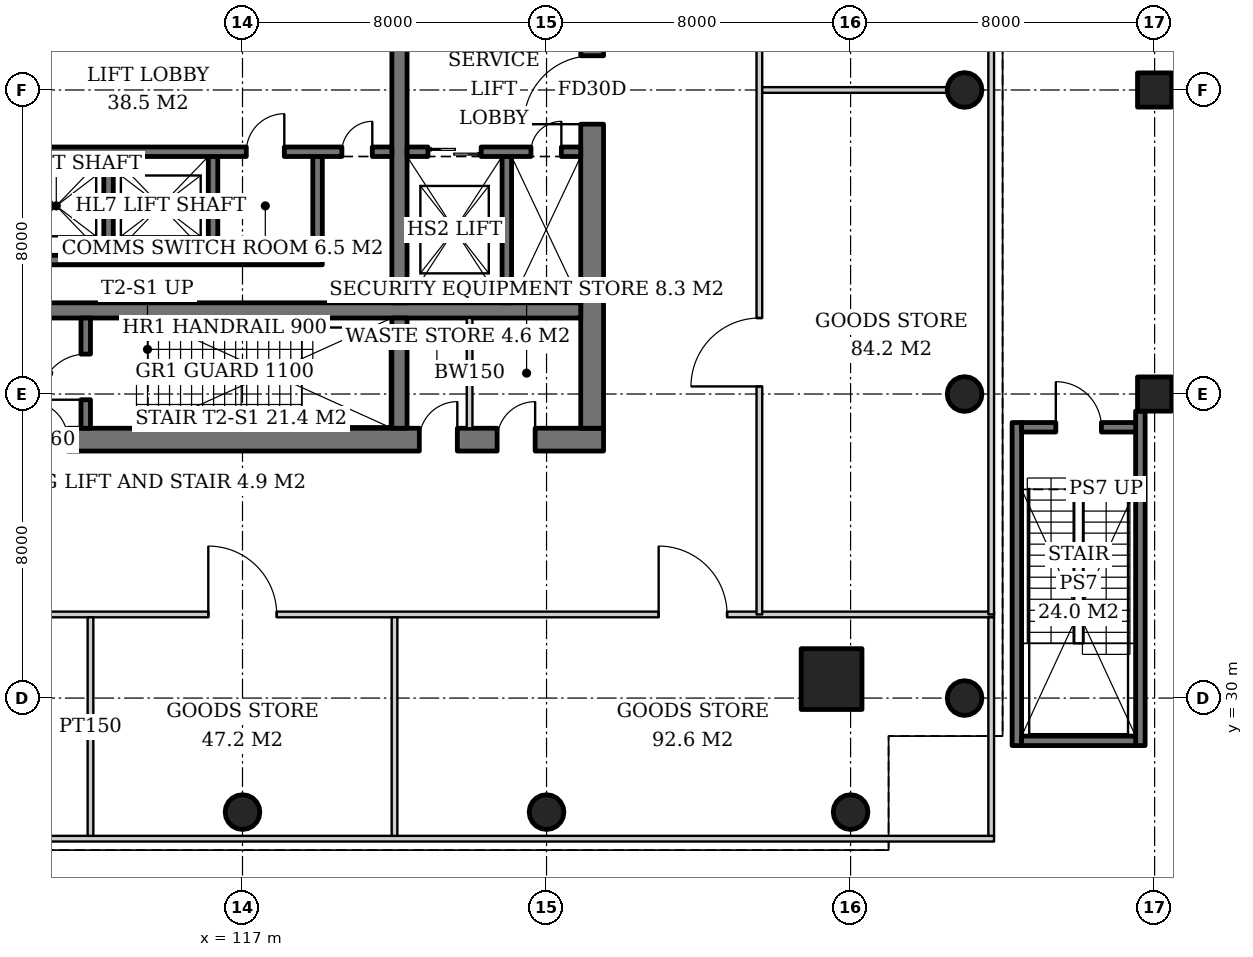
"""IFC4 building model, lengths in metres.
Left out: names, types, materials, properties, quantities, classifications, styles, units other than length and angle.
Written with IfcOpenShell. Run it as: python <this file> out.ifc"""

import sys

from ifc_helpers import new_model, si_unit, direction, frame, frame_2d, origin, origin_2d, place, context, subcontext, project, spatial, rectangle, hollow_circle, extrude, element, fill, save


model = new_model("IFC4")
c1 = context("Model", 3, precision=1e-05, world=origin(), true_north=direction((0.0, 1.0)))
c2 = subcontext(c1, "Body", "Model", "MODEL_VIEW")
j1 = project(units=[si_unit("LENGTHUNIT", "METRE"), si_unit("PLANEANGLEUNIT", "RADIAN")], contexts=[c1])
p1 = place(None, origin())
s1 = spatial("IfcSite", under=j1, at=p1, CompositionType="ELEMENT")
p2 = place(p1, origin())
s2 = spatial("IfcBuilding", under=s1, at=p2, CompositionType="ELEMENT")
p3 = place(p2, frame((0.0, 0.0, 6.0)))
s3 = spatial("IfcBuildingStorey", under=s2, at=p3, CompositionType="ELEMENT", Elevation=6.0)
for number, where, z_axis, x_axis in (
    (1, (141.0, 38.0, 0.0), (0.0, 0.0, 1.0), (1.0, 0.0, 0.0)),
    (2, (141.0, 46.0, 0.0), (0.0, 0.0, 1.0), (1.0, 0.0, 0.0)),
):
    element("IfcColumn", number, at=place(p3, frame(where, z_axis=z_axis, x_axis=x_axis)), inside=s3, PredefinedType="COLUMN", context=c2, shape_type="SweptSolid", body=[
        extrude(rectangle(XDim=0.9, YDim=0.9, at=origin_2d()), origin(), (0.0, 0.0, 1.0), 5.0),
    ])
for number, where, z_axis, x_axis in (
    (3, (136.0, 30.0, 0.0), (0.0, 0.0, 1.0), (1.0, 0.0, 0.0)),
    (4, (136.0, 38.0, 0.0), (0.0, 0.0, 1.0), (1.0, 0.0, 0.0)),
    (5, (136.0, 46.0, 0.0), (0.0, 0.0, 1.0), (1.0, 0.0, 0.0)),
):
    element("IfcColumn", number, at=place(p3, frame(where, z_axis=z_axis, x_axis=x_axis)), inside=s3, PredefinedType="COLUMN", context=c2, shape_type="SweptSolid", body=[
        extrude(hollow_circle(Radius=0.457, WallThickness=0.03, at=origin_2d()), origin(), (0.0, 0.0, 1.0), 5.0),
    ])
p4 = place(p3, frame((132.5, 30.5, 0.0), z_axis=(0.0, 0.0, 1.0), x_axis=(1.0, 0.0, 0.0)))
e6 = element("IfcColumn", 6, at=p4, inside=s3, PredefinedType="COLUMN", context=c2, shape_type="SweptSolid", body=[
    extrude(rectangle(XDim=1.6, YDim=1.6, at=origin_2d()), origin(), (0.0, 0.0, 1.0), 5.0),
])
for number, where, z_axis, x_axis in (
    (7, (133.0, 27.0, 0.0), (0.0, 0.0, 1.0), (1.0, 0.0, 0.0)),
    (8, (117.0, 27.0, 0.0), (0.0, 0.0, 1.0), (1.0, 0.0, 0.0)),
    (9, (125.0, 27.0, 0.0), (0.0, 0.0, 1.0), (1.0, 0.0, 0.0)),
):
    element("IfcColumn", number, at=place(p3, frame(where, z_axis=z_axis, x_axis=x_axis)), inside=s3, PredefinedType="COLUMN", context=c2, shape_type="SweptSolid", body=[
        extrude(hollow_circle(Radius=0.457, WallThickness=0.03, at=origin_2d()), origin(), (0.0, 0.0, 1.0), 5.0),
    ])
p5 = place(p3, frame((107.5, 36.8, 0.0), z_axis=(0.0, 0.0, 1.0), x_axis=(1.0, 0.0, 0.0)))
e10 = element("IfcWall", 10, at=p5, inside=s3, PredefinedType="SHEAR", context=c2, shape_type="SweptSolid", body=[
    extrude(rectangle(XDim=19.0, YDim=0.6, at=frame_2d((9.5, 0.0))), origin(), (0.0, 0.0, 1.0), 5.0),
])
p6 = place(p5, frame((3.9, 0.0, 0.0)))
e11 = element("IfcOpeningElement", 11, at=p6, cuts=e10, PredefinedType="OPENING", context=c2, shape_type="SweptSolid", body=[
    extrude(rectangle(XDim=1.0, YDim=2.1, at=frame_2d((0.5, 1.05))), frame((0.0, 0.31, 0.0), z_axis=(0.0, -1.0, 0.0), x_axis=(1.0, 0.0, 0.0)), (0.0, 0.0, 1.0), 0.62),
])
p7 = place(p5, frame((14.153, 0.0, 0.0)))
e12 = element("IfcOpeningElement", 12, at=p7, cuts=e10, PredefinedType="OPENING", context=c2, shape_type="SweptSolid", body=[
    extrude(rectangle(XDim=1.0, YDim=2.1, at=frame_2d((0.5, 1.05))), frame((0.0, 0.31, 0.0), z_axis=(0.0, -1.0, 0.0), x_axis=(1.0, 0.0, 0.0)), (0.0, 0.0, 1.0), 0.62),
])
p8 = place(p5, frame((16.2, 0.0, 0.0)))
e13 = element("IfcOpeningElement", 13, at=p8, cuts=e10, PredefinedType="OPENING", context=c2, shape_type="SweptSolid", body=[
    extrude(rectangle(XDim=1.0, YDim=2.1, at=frame_2d((0.5, 1.05))), frame((0.0, 0.31, 0.0), z_axis=(0.0, -1.0, 0.0), x_axis=(1.0, 0.0, 0.0)), (0.0, 0.0, 1.0), 0.62),
])
p9 = place(p3, frame((126.2, 37.1, 0.0), z_axis=(0.0, 0.0, 1.0), x_axis=(0.0, 1.0, 0.0)))
e14 = element("IfcWall", 14, at=p9, inside=s3, PredefinedType="SHEAR", context=c2, shape_type="SweptSolid", body=[
    extrude(rectangle(XDim=17.8, YDim=0.6, at=frame_2d((8.9, 0.0))), origin(), (0.0, 0.0, 1.0), 5.0),
])
p10 = place(p9, frame((8.0, 0.0, 0.0)))
e15 = element("IfcOpeningElement", 15, at=p10, cuts=e14, PredefinedType="OPENING", context=c2, shape_type="SweptSolid", body=[
    extrude(rectangle(XDim=1.8, YDim=2.4, at=frame_2d((0.9, 1.2))), frame((0.0, 0.31, 0.0), z_axis=(0.0, -1.0, 0.0), x_axis=(1.0, 0.0, 0.0)), (0.0, 0.0, 1.0), 0.62),
])
p11 = place(p3, frame((108.1, 40.2, 0.0), z_axis=(0.0, 0.0, 1.0), x_axis=(1.0, 0.0, 0.0)))
e16 = element("IfcWall", 16, at=p11, inside=s3, PredefinedType="SHEAR", context=c2, shape_type="SweptSolid", body=[
    extrude(rectangle(XDim=17.8, YDim=0.4, at=frame_2d((8.9, 0.0))), origin(), (0.0, 0.0, 1.0), 5.0),
])
p12 = place(p3, frame((121.13, 37.1, 0.0), z_axis=(0.0, 0.0, 1.0), x_axis=(0.0, 1.0, 0.0)))
e17 = element("IfcWall", 17, at=p12, inside=s3, PredefinedType="SHEAR", context=c2, shape_type="SweptSolid", body=[
    extrude(rectangle(XDim=2.9, YDim=0.4, at=frame_2d((1.45, 0.0))), origin(), (0.0, 0.0, 1.0), 5.0),
])
p13 = place(p3, frame((121.13, 40.4, 0.0), z_axis=(0.0, 0.0, 1.0), x_axis=(0.0, 1.0, 0.0)))
e18 = element("IfcWall", 18, at=p13, inside=s3, PredefinedType="SHEAR", context=c2, shape_type="SweptSolid", body=[
    extrude(rectangle(XDim=11.2, YDim=0.4, at=frame_2d((5.6, 0.0))), origin(), (0.0, 0.0, 1.0), 5.0),
])
p14 = place(p3, frame((112.875, 37.1, 0.0), z_axis=(0.0, 0.0, 1.0), x_axis=(0.0, 1.0, 0.0)))
e19 = element("IfcWall", 19, at=p14, inside=s3, PredefinedType="SHEAR", context=c2, shape_type="SweptSolid", body=[
    extrude(rectangle(XDim=2.9, YDim=0.25, at=frame_2d((1.45, 0.0))), origin(), (0.0, 0.0, 1.0), 5.0),
])
p15 = place(p14, frame((0.75, 0.0, 0.0)))
e20 = element("IfcOpeningElement", 20, at=p15, cuts=e19, PredefinedType="OPENING", context=c2, shape_type="SweptSolid", body=[
    extrude(rectangle(XDim=1.2, YDim=2.1, at=frame_2d((0.6, 1.05))), frame((0.0, 0.135, 0.0), z_axis=(0.0, -1.0, 0.0), x_axis=(1.0, 0.0, 0.0)), (0.0, 0.0, 1.0), 0.27),
])
for number, where, z_axis, x_axis in (
    (21, (113.475, 44.25, 0.0), (0.0, 0.0, 1.0), (0.0, -1.0, 0.0)),
    (22, (116.225, 44.25, 0.0), (0.0, 0.0, 1.0), (0.0, -1.0, 0.0)),
    (23, (118.975, 44.25, 0.0), (0.0, 0.0, 1.0), (0.0, -1.0, 0.0)),
):
    element("IfcWall", number, at=place(p3, frame(where, z_axis=z_axis, x_axis=x_axis)), inside=s3, PredefinedType="SHEAR", context=c2, shape_type="SweptSolid", body=[
        extrude(rectangle(XDim=2.6, YDim=0.25, at=frame_2d((1.3, 0.0))), origin(), (0.0, 0.0, 1.0), 5.0),
    ])
p16 = place(p3, frame((108.1, 41.525, 0.0), z_axis=(0.0, 0.0, 1.0), x_axis=(1.0, 0.0, 0.0)))
e24 = element("IfcWall", 24, at=p16, inside=s3, PredefinedType="SHEAR", context=c2, shape_type="SweptSolid", body=[
    extrude(rectangle(XDim=11.0, YDim=0.25, at=frame_2d((5.5, 0.0))), origin(), (0.0, 0.0, 1.0), 5.0),
])
p17 = place(p3, frame((108.1, 44.375, 0.0), z_axis=(0.0, 0.0, 1.0), x_axis=(1.0, 0.0, 0.0)))
e25 = element("IfcWall", 25, at=p17, inside=s3, PredefinedType="SHEAR", context=c2, shape_type="SweptSolid", body=[
    extrude(rectangle(XDim=12.83, YDim=0.25, at=frame_2d((6.415, 0.0))), origin(), (0.0, 0.0, 1.0), 5.0),
])
p18 = place(p17, frame((9.0, 0.0, 0.0)))
e26 = element("IfcOpeningElement", 26, at=p18, cuts=e25, PredefinedType="OPENING", context=c2, shape_type="SweptSolid", body=[
    extrude(rectangle(XDim=1.0, YDim=2.1, at=frame_2d((0.5, 1.05))), frame((0.0, 0.135, 0.0), z_axis=(0.0, -1.0, 0.0), x_axis=(1.0, 0.0, 0.0)), (0.0, 0.0, 1.0), 0.27),
])
p19 = place(p17, frame((11.515, 0.0, 0.0)))
e27 = element("IfcOpeningElement", 27, at=p19, cuts=e25, PredefinedType="OPENING", context=c2, shape_type="SweptSolid", body=[
    extrude(rectangle(XDim=0.8, YDim=2.0, at=frame_2d((0.4, 1.0))), frame((0.0, 0.135, 0.0), z_axis=(0.0, -1.0, 0.0), x_axis=(1.0, 0.0, 0.0)), (0.0, 0.0, 1.0), 0.27),
])
p20 = place(p3, frame((123.955, 44.25, 0.0), z_axis=(0.0, 0.0, 1.0), x_axis=(0.0, -1.0, 0.0)))
e28 = element("IfcWall", 28, at=p20, inside=s3, PredefinedType="SHEAR", context=c2, shape_type="SweptSolid", body=[
    extrude(rectangle(XDim=3.85, YDim=0.25, at=frame_2d((1.925, 0.0))), origin(), (0.0, 0.0, 1.0), 5.0),
])
p21 = place(p3, frame((121.33, 44.375, 0.0), z_axis=(0.0, 0.0, 1.0), x_axis=(1.0, 0.0, 0.0)))
e29 = element("IfcWall", 29, at=p21, inside=s3, PredefinedType="SHEAR", context=c2, shape_type="SweptSolid", body=[
    extrude(rectangle(XDim=4.57, YDim=0.25, at=frame_2d((2.285, 0.0))), origin(), (0.0, 0.0, 1.0), 5.0),
])
p22 = place(p21, frame((0.55, 0.0, 0.0)))
e30 = element("IfcOpeningElement", 30, at=p22, cuts=e29, PredefinedType="OPENING", context=c2, shape_type="SweptSolid", body=[
    extrude(rectangle(XDim=1.4, YDim=2.4, at=frame_2d((0.7, 1.2))), frame((0.0, 0.135, 0.0), z_axis=(0.0, -1.0, 0.0), x_axis=(1.0, 0.0, 0.0)), (0.0, 0.0, 1.0), 0.27),
])
p23 = place(p21, frame((3.26, 0.0, 0.0)))
e31 = element("IfcOpeningElement", 31, at=p23, cuts=e29, PredefinedType="OPENING", context=c2, shape_type="SweptSolid", body=[
    extrude(rectangle(XDim=0.8, YDim=2.0, at=frame_2d((0.4, 1.0))), frame((0.0, 0.135, 0.0), z_axis=(0.0, -1.0, 0.0), x_axis=(1.0, 0.0, 0.0)), (0.0, 0.0, 1.0), 0.27),
])
p24 = place(p3, frame((122.975, 37.1, 0.0), z_axis=(0.0, 0.0, 1.0), x_axis=(0.0, 1.0, 0.0)))
e32 = element("IfcWall", 32, at=p24, inside=s3, PredefinedType="SOLIDWALL", context=c2, shape_type="SweptSolid", body=[
    extrude(rectangle(XDim=2.9, YDim=0.15, at=frame_2d((1.45, 0.0))), origin(), (0.0, 0.0, 1.0), 4.7),
])
p25 = place(p3, frame((137.375, 28.75, 0.0), z_axis=(0.0, 0.0, 1.0), x_axis=(0.0, 1.0, 0.0)))
e33 = element("IfcWall", 33, at=p25, inside=s3, PredefinedType="SOLIDWALL", context=c2, shape_type="SweptSolid", body=[
    extrude(rectangle(XDim=8.5, YDim=0.25, at=frame_2d((4.25, 0.0))), origin(), (0.0, 0.0, 1.0), 4.7),
])
p26 = place(p3, frame((140.625, 28.75, 0.0), z_axis=(0.0, 0.0, 1.0), x_axis=(0.0, 1.0, 0.0)))
e34 = element("IfcWall", 34, at=p26, inside=s3, PredefinedType="SOLIDWALL", context=c2, shape_type="SweptSolid", body=[
    extrude(rectangle(XDim=8.8, YDim=0.25, at=frame_2d((4.4, 0.0))), origin(), (0.0, 0.0, 1.0), 4.7),
])
p27 = place(p3, frame((137.5, 28.875, 0.0), z_axis=(0.0, 0.0, 1.0), x_axis=(1.0, 0.0, 0.0)))
e35 = element("IfcWall", 35, at=p27, inside=s3, PredefinedType="SOLIDWALL", context=c2, shape_type="SweptSolid", body=[
    extrude(rectangle(XDim=3.0, YDim=0.25, at=frame_2d((1.5, 0.0))), origin(), (0.0, 0.0, 1.0), 4.7),
])
p28 = place(p3, frame((137.5, 37.125, 0.0), z_axis=(0.0, 0.0, 1.0), x_axis=(1.0, 0.0, 0.0)))
e36 = element("IfcWall", 36, at=p28, inside=s3, PredefinedType="SOLIDWALL", context=c2, shape_type="SweptSolid", body=[
    extrude(rectangle(XDim=3.0, YDim=0.25, at=frame_2d((1.5, 0.0))), origin(), (0.0, 0.0, 1.0), 4.7),
])
p29 = place(p28, frame((0.9, 0.0, 0.0)))
e37 = element("IfcOpeningElement", 37, at=p29, cuts=e36, PredefinedType="OPENING", context=c2, shape_type="SweptSolid", body=[
    extrude(rectangle(XDim=1.2, YDim=2.1, at=frame_2d((0.6, 1.05))), frame((0.0, 0.135, 0.0), z_axis=(0.0, -1.0, 0.0), x_axis=(1.0, 0.0, 0.0)), (0.0, 0.0, 1.0), 0.27),
])
p30 = place(p3, frame((97.225, 26.3, 0.0), z_axis=(0.0, 0.0, 1.0), x_axis=(1.0, 0.0, 0.0)))
e38 = element("IfcWall", 38, at=p30, inside=s3, PredefinedType="PARTITIONING", context=c2, shape_type="SweptSolid", body=[
    extrude(rectangle(XDim=39.55, YDim=0.15, at=frame_2d((19.775, 0.0))), origin(), (0.0, 0.0, 1.0), 4.7),
])
p31 = place(p3, frame((97.225, 32.2, 0.0), z_axis=(0.0, 0.0, 1.0), x_axis=(1.0, 0.0, 0.0)))
e39 = element("IfcWall", 39, at=p31, inside=s3, PredefinedType="PARTITIONING", context=c2, shape_type="SweptSolid", body=[
    extrude(rectangle(XDim=39.55, YDim=0.15, at=frame_2d((19.775, 0.0))), origin(), (0.0, 0.0, 1.0), 3.9),
])
p32 = place(p31, frame((7.025, 0.0, 0.0)))
e40 = element("IfcOpeningElement", 40, at=p32, cuts=e39, PredefinedType="OPENING", context=c2, shape_type="SweptSolid", body=[
    extrude(rectangle(XDim=1.8, YDim=2.4, at=frame_2d((0.9, 1.2))), frame((0.0, 0.085, 0.0), z_axis=(0.0, -1.0, 0.0), x_axis=(1.0, 0.0, 0.0)), (0.0, 0.0, 1.0), 0.17),
])
p33 = place(p31, frame((18.875, 0.0, 0.0)))
e41 = element("IfcOpeningElement", 41, at=p33, cuts=e39, PredefinedType="OPENING", context=c2, shape_type="SweptSolid", body=[
    extrude(rectangle(XDim=1.8, YDim=2.4, at=frame_2d((0.9, 1.2))), frame((0.0, 0.085, 0.0), z_axis=(0.0, -1.0, 0.0), x_axis=(1.0, 0.0, 0.0)), (0.0, 0.0, 1.0), 0.17),
])
p34 = place(p31, frame((30.725, 0.0, 0.0)))
e42 = element("IfcOpeningElement", 42, at=p34, cuts=e39, PredefinedType="OPENING", context=c2, shape_type="SweptSolid", body=[
    extrude(rectangle(XDim=1.8, YDim=2.4, at=frame_2d((0.9, 1.2))), frame((0.0, 0.085, 0.0), z_axis=(0.0, -1.0, 0.0), x_axis=(1.0, 0.0, 0.0)), (0.0, 0.0, 1.0), 0.17),
])
p35 = place(p3, frame((136.7, 26.375, 0.0), z_axis=(0.0, 0.0, 1.0), x_axis=(0.0, 1.0, 0.0)))
e43 = element("IfcWall", 43, at=p35, inside=s3, PredefinedType="PARTITIONING", context=c2, shape_type="SweptSolid", body=[
    extrude(rectangle(XDim=5.75, YDim=0.15, at=frame_2d((2.875, 0.0))), origin(), (0.0, 0.0, 1.0), 4.7),
])
for number, where, z_axis, x_axis in (
    (44, (113.0, 26.375, 0.0), (0.0, 0.0, 1.0), (0.0, 1.0, 0.0)),
    (45, (121.0, 26.375, 0.0), (0.0, 0.0, 1.0), (0.0, 1.0, 0.0)),
):
    element("IfcWall", number, at=place(p3, frame(where, z_axis=z_axis, x_axis=x_axis)), inside=s3, PredefinedType="PARTITIONING", context=c2, shape_type="SweptSolid", body=[
        extrude(rectangle(XDim=5.75, YDim=0.15, at=frame_2d((2.875, 0.0))), origin(), (0.0, 0.0, 1.0), 4.15),
    ])
p36 = place(p3, frame((130.6, 32.2, 0.0), z_axis=(0.0, 0.0, 1.0), x_axis=(0.0, 1.0, 0.0)))
e46 = element("IfcWall", 46, at=p36, inside=s3, PredefinedType="PARTITIONING", context=c2, shape_type="SweptSolid", body=[
    extrude(rectangle(XDim=27.6, YDim=0.15, at=frame_2d((13.8, 0.0))), origin(), (0.0, 0.0, 1.0), 3.9),
])
p37 = place(p36, frame((6.0, 0.0, 0.0)))
e47 = element("IfcOpeningElement", 47, at=p37, cuts=e46, PredefinedType="OPENING", context=c2, shape_type="SweptSolid", body=[
    extrude(rectangle(XDim=1.8, YDim=2.4, at=frame_2d((0.9, 1.2))), frame((0.0, 0.085, 0.0), z_axis=(0.0, -1.0, 0.0), x_axis=(1.0, 0.0, 0.0)), (0.0, 0.0, 1.0), 0.17),
])
p38 = place(p36, frame((19.8, 0.0, 0.0)))
e48 = element("IfcOpeningElement", 48, at=p38, cuts=e46, PredefinedType="OPENING", context=c2, shape_type="SweptSolid", body=[
    extrude(rectangle(XDim=1.8, YDim=2.4, at=frame_2d((0.9, 1.2))), frame((0.0, 0.085, 0.0), z_axis=(0.0, -1.0, 0.0), x_axis=(1.0, 0.0, 0.0)), (0.0, 0.0, 1.0), 0.17),
])
p39 = place(p3, frame((136.7, 32.2, 0.0), z_axis=(0.0, 0.0, 1.0), x_axis=(0.0, 1.0, 0.0)))
e49 = element("IfcWall", 49, at=p39, inside=s3, PredefinedType="PARTITIONING", context=c2, shape_type="SweptSolid", body=[
    extrude(rectangle(XDim=27.6, YDim=0.15, at=frame_2d((13.8, 0.0))), origin(), (0.0, 0.0, 1.0), 4.7),
])
p40 = place(p3, frame((130.675, 46.0, 0.0), z_axis=(0.0, 0.0, 1.0), x_axis=(1.0, 0.0, 0.0)))
e50 = element("IfcWall", 50, at=p40, inside=s3, PredefinedType="PARTITIONING", context=c2, shape_type="SweptSolid", body=[
    extrude(rectangle(XDim=4.868, YDim=0.15, at=frame_2d((2.434, 0.0))), origin(), (0.0, 0.0, 1.0), 4.7),
])
p41 = place(p15, origin())
e51 = element("IfcDoor", 51, at=p41, inside=s3, OperationType="SINGLE_SWING_LEFT", PredefinedType="DOOR", context=c2, shape_type="SweptSolid", body=[
    extrude(rectangle(XDim=1.2, YDim=2.1, at=frame_2d((0.6, 1.05))), frame((0.0, 0.025, 0.0), z_axis=(0.0, -1.0, 0.0), x_axis=(1.0, 0.0, 0.0)), (0.0, 0.0, 1.0), 0.05),
])
fill(e20, e51)
p42 = place(p18, origin())
e52 = element("IfcDoor", 52, at=p42, inside=s3, OperationType="SINGLE_SWING_RIGHT", PredefinedType="DOOR", context=c2, shape_type="SweptSolid", body=[
    extrude(rectangle(XDim=1.0, YDim=2.1, at=frame_2d((0.5, 1.05))), frame((0.0, 0.025, 0.0), z_axis=(0.0, -1.0, 0.0), x_axis=(1.0, 0.0, 0.0)), (0.0, 0.0, 1.0), 0.05),
])
fill(e26, e52)
p43 = place(p19, origin())
e53 = element("IfcDoor", 53, at=p43, inside=s3, OperationType="SINGLE_SWING_RIGHT", PredefinedType="DOOR", context=c2, shape_type="SweptSolid", body=[
    extrude(rectangle(XDim=0.8, YDim=2.0, at=frame_2d((0.4, 1.0))), frame((0.0, 0.025, 0.0), z_axis=(0.0, -1.0, 0.0), x_axis=(1.0, 0.0, 0.0)), (0.0, 0.0, 1.0), 0.05),
])
fill(e27, e53)
p44 = place(p22, origin())
e54 = element("IfcDoor", 54, at=p44, inside=s3, OperationType="DOUBLE_DOOR_SLIDING", PredefinedType="DOOR", context=c2, shape_type="SweptSolid", body=[
    extrude(rectangle(XDim=1.4, YDim=2.4, at=frame_2d((0.7, 1.2))), frame((0.0, 0.025, 0.0), z_axis=(0.0, -1.0, 0.0), x_axis=(1.0, 0.0, 0.0)), (0.0, 0.0, 1.0), 0.05),
])
fill(e30, e54)
p45 = place(p23, origin())
e55 = element("IfcDoor", 55, at=p45, inside=s3, OperationType="SINGLE_SWING_RIGHT", PredefinedType="DOOR", context=c2, shape_type="SweptSolid", body=[
    extrude(rectangle(XDim=0.8, YDim=2.0, at=frame_2d((0.4, 1.0))), frame((0.0, 0.025, 0.0), z_axis=(0.0, -1.0, 0.0), x_axis=(1.0, 0.0, 0.0)), (0.0, 0.0, 1.0), 0.05),
])
fill(e31, e55)
p46 = place(p6, origin())
e56 = element("IfcDoor", 56, at=p46, inside=s3, OperationType="SINGLE_SWING_LEFT", PredefinedType="DOOR", context=c2, shape_type="SweptSolid", body=[
    extrude(rectangle(XDim=1.0, YDim=2.1, at=frame_2d((0.5, 1.05))), frame((0.0, 0.025, 0.0), z_axis=(0.0, -1.0, 0.0), x_axis=(1.0, 0.0, 0.0)), (0.0, 0.0, 1.0), 0.05),
])
fill(e11, e56)
p47 = place(p10, origin())
e57 = element("IfcDoor", 57, at=p47, inside=s3, OperationType="DOUBLE_DOOR_SINGLE_SWING", PredefinedType="DOOR", context=c2, shape_type="SweptSolid", body=[
    extrude(rectangle(XDim=1.8, YDim=2.4, at=frame_2d((0.9, 1.2))), frame((0.0, 0.025, 0.0), z_axis=(0.0, -1.0, 0.0), x_axis=(1.0, 0.0, 0.0)), (0.0, 0.0, 1.0), 0.05),
])
fill(e15, e57)
p48 = place(p7, origin())
e58 = element("IfcDoor", 58, at=p48, inside=s3, OperationType="SINGLE_SWING_RIGHT", PredefinedType="DOOR", context=c2, shape_type="SweptSolid", body=[
    extrude(rectangle(XDim=1.0, YDim=2.1, at=frame_2d((0.5, 1.05))), frame((0.0, 0.29, 0.0), z_axis=(0.0, -1.0, 0.0), x_axis=(1.0, 0.0, 0.0)), (0.0, 0.0, 1.0), 0.05),
])
fill(e12, e58)
p49 = place(p8, origin())
e59 = element("IfcDoor", 59, at=p49, inside=s3, OperationType="SINGLE_SWING_RIGHT", PredefinedType="DOOR", context=c2, shape_type="SweptSolid", body=[
    extrude(rectangle(XDim=1.0, YDim=2.1, at=frame_2d((0.5, 1.05))), frame((0.0, 0.29, 0.0), z_axis=(0.0, -1.0, 0.0), x_axis=(1.0, 0.0, 0.0)), (0.0, 0.0, 1.0), 0.05),
])
fill(e13, e59)
p50 = place(p29, origin())
e60 = element("IfcDoor", 60, at=p50, inside=s3, OperationType="SINGLE_SWING_LEFT", PredefinedType="DOOR", context=c2, shape_type="SweptSolid", body=[
    extrude(rectangle(XDim=1.2, YDim=2.1, at=frame_2d((0.6, 1.05))), frame((0.0, 0.025, 0.0), z_axis=(0.0, -1.0, 0.0), x_axis=(1.0, 0.0, 0.0)), (0.0, 0.0, 1.0), 0.05),
])
fill(e37, e60)
p51 = place(p33, origin())
e61 = element("IfcDoor", 61, at=p51, inside=s3, OperationType="DOUBLE_DOOR_SINGLE_SWING", PredefinedType="DOOR", context=c2, shape_type="SweptSolid", body=[
    extrude(rectangle(XDim=1.8, YDim=2.4, at=frame_2d((0.9, 1.2))), frame((0.0, 0.025, 0.0), z_axis=(0.0, -1.0, 0.0), x_axis=(1.0, 0.0, 0.0)), (0.0, 0.0, 1.0), 0.05),
])
fill(e41, e61)
p52 = place(p34, origin())
e62 = element("IfcDoor", 62, at=p52, inside=s3, OperationType="DOUBLE_DOOR_SINGLE_SWING", PredefinedType="DOOR", context=c2, shape_type="SweptSolid", body=[
    extrude(rectangle(XDim=1.8, YDim=2.4, at=frame_2d((0.9, 1.2))), frame((0.0, 0.025, 0.0), z_axis=(0.0, -1.0, 0.0), x_axis=(1.0, 0.0, 0.0)), (0.0, 0.0, 1.0), 0.05),
])
fill(e42, e62)
p53 = place(p37, origin())
e63 = element("IfcDoor", 63, at=p53, inside=s3, OperationType="DOUBLE_DOOR_SINGLE_SWING", PredefinedType="DOOR", context=c2, shape_type="SweptSolid", body=[
    extrude(rectangle(XDim=1.8, YDim=2.4, at=frame_2d((0.9, 1.2))), frame((0.0, 0.025, 0.0), z_axis=(0.0, -1.0, 0.0), x_axis=(1.0, 0.0, 0.0)), (0.0, 0.0, 1.0), 0.05),
])
fill(e47, e63)
save(model, sys.argv[1])
